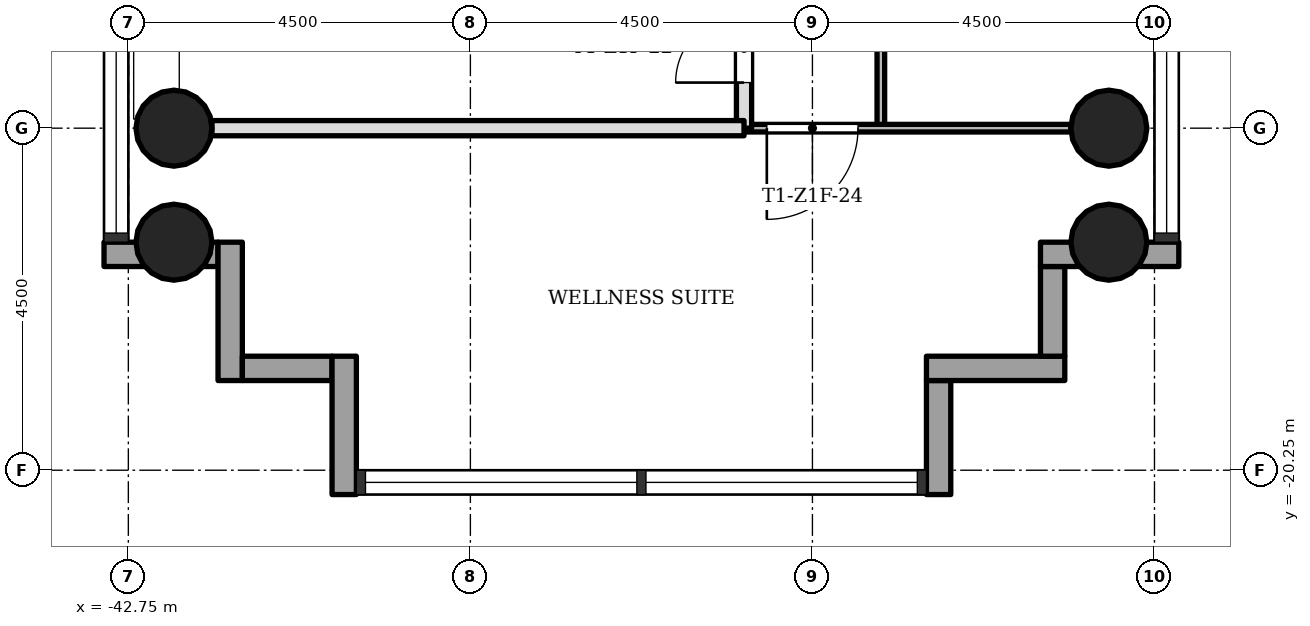
"""IFC4 building model, lengths in metres.
Left out: names, types, materials, properties, quantities, classifications, styles, units other than length and angle.
Written with IfcOpenShell. Run it as: python <this file> out.ifc"""

import sys

from ifc_helpers import new_model, si_unit, direction, frame, frame_2d, origin, origin_2d, place, context, subcontext, project, spatial, rectangle, hollow_circle, extrude, element, fill, save


model = new_model("IFC4")
c1 = context("Model", 3, precision=1e-05, world=origin(), true_north=direction((0.0, 1.0)))
c2 = subcontext(c1, "Body", "Model", "MODEL_VIEW")
j1 = project(units=[si_unit("LENGTHUNIT", "METRE"), si_unit("PLANEANGLEUNIT", "RADIAN")], contexts=[c1])
p1 = place(None, origin())
s1 = spatial("IfcSite", under=j1, at=p1, CompositionType="ELEMENT")
p2 = place(p1, origin())
s2 = spatial("IfcBuilding", under=s1, at=p2, CompositionType="ELEMENT")
p3 = place(p2, frame((0.0, 0.0, 68.7)))
s3 = spatial("IfcBuildingStorey", under=s2, at=p3, CompositionType="ELEMENT", Elevation=68.7)
for number, where, z_axis, x_axis in (
    (1, (-42.15, -15.75, 0.0), (0.0, 0.0, 1.0), (1.0, 0.0, 0.0)),
    (2, (-29.85, -15.75, 0.0), (0.0, 0.0, 1.0), (1.0, 0.0, 0.0)),
    (3, (-42.15, -17.25, 0.0), (0.0, 0.0, 1.0), (1.0, 0.0, 0.0)),
    (4, (-29.85, -17.25, 0.0), (0.0, 0.0, 1.0), (1.0, 0.0, 0.0)),
):
    element("IfcColumn", number, at=place(p3, frame(where, z_axis=z_axis, x_axis=x_axis)), inside=s3, PredefinedType="COLUMN", context=c2, shape_type="SweptSolid", body=[
        extrude(hollow_circle(Radius=0.5, WallThickness=0.036, at=origin_2d()), origin(), (0.0, 0.0, 1.0), 3.4),
    ])
p4 = place(p3, frame((-43.07, -17.41, -0.3), z_axis=(0.0, 0.0, 1.0), x_axis=(1.0, 0.0, 0.0)))
e5 = element("IfcWall", 5, at=p4, inside=s3, PredefinedType="STANDARD", context=c2, shape_type="SweptSolid", body=[
    extrude(rectangle(XDim=1.5, YDim=0.32, at=frame_2d((0.75, 0.0))), origin(), (0.0, 0.0, 1.0), 3.4),
])
p5 = place(p3, frame((-41.41, -17.25, -0.3), z_axis=(0.0, 0.0, 1.0), x_axis=(0.0, -1.0, 0.0)))
e6 = element("IfcWall", 6, at=p5, inside=s3, PredefinedType="STANDARD", context=c2, shape_type="SweptSolid", body=[
    extrude(rectangle(XDim=1.82, YDim=0.32, at=frame_2d((0.91, 0.0))), origin(), (0.0, 0.0, 1.0), 3.4),
])
p6 = place(p3, frame((-41.25, -18.91, -0.3), z_axis=(0.0, 0.0, 1.0), x_axis=(1.0, 0.0, 0.0)))
e7 = element("IfcWall", 7, at=p6, inside=s3, PredefinedType="STANDARD", context=c2, shape_type="SweptSolid", body=[
    extrude(rectangle(XDim=1.18, YDim=0.32, at=frame_2d((0.59, 0.0))), origin(), (0.0, 0.0, 1.0), 3.4),
])
p7 = place(p3, frame((-39.91, -18.75, -0.3), z_axis=(0.0, 0.0, 1.0), x_axis=(0.0, -1.0, 0.0)))
e8 = element("IfcWall", 8, at=p7, inside=s3, PredefinedType="STANDARD", context=c2, shape_type="SweptSolid", body=[
    extrude(rectangle(XDim=1.82, YDim=0.32, at=frame_2d((0.91, 0.0))), origin(), (0.0, 0.0, 1.0), 3.4),
])
p8 = place(p3, frame((-32.09, -20.57, -0.3), z_axis=(0.0, 0.0, 1.0), x_axis=(0.0, 1.0, 0.0)))
e9 = element("IfcWall", 9, at=p8, inside=s3, PredefinedType="STANDARD", context=c2, shape_type="SweptSolid", body=[
    extrude(rectangle(XDim=1.5, YDim=0.32, at=frame_2d((0.75, 0.0))), origin(), (0.0, 0.0, 1.0), 3.4),
])
p9 = place(p3, frame((-32.25, -18.91, -0.3), z_axis=(0.0, 0.0, 1.0), x_axis=(1.0, 0.0, 0.0)))
e10 = element("IfcWall", 10, at=p9, inside=s3, PredefinedType="STANDARD", context=c2, shape_type="SweptSolid", body=[
    extrude(rectangle(XDim=1.82, YDim=0.32, at=frame_2d((0.91, 0.0))), origin(), (0.0, 0.0, 1.0), 3.4),
])
p10 = place(p3, frame((-30.59, -18.75, -0.3), z_axis=(0.0, 0.0, 1.0), x_axis=(0.0, 1.0, 0.0)))
e11 = element("IfcWall", 11, at=p10, inside=s3, PredefinedType="STANDARD", context=c2, shape_type="SweptSolid", body=[
    extrude(rectangle(XDim=1.18, YDim=0.32, at=frame_2d((0.59, 0.0))), origin(), (0.0, 0.0, 1.0), 3.4),
])
p11 = place(p3, frame((-30.75, -17.41, -0.3), z_axis=(0.0, 0.0, 1.0), x_axis=(1.0, 0.0, 0.0)))
e12 = element("IfcWall", 12, at=p11, inside=s3, PredefinedType="STANDARD", context=c2, shape_type="SweptSolid", body=[
    extrude(rectangle(XDim=1.82, YDim=0.32, at=frame_2d((0.91, 0.0))), origin(), (0.0, 0.0, 1.0), 3.4),
])
p12 = place(p3, frame((-34.65, -15.75, 0.0), z_axis=(0.0, 0.0, 1.0), x_axis=(0.0, 1.0, 0.0)))
e13 = element("IfcWall", 13, at=p12, inside=s3, PredefinedType="SOLIDWALL", context=c2, shape_type="SweptSolid", body=[
    extrude(rectangle(XDim=4.5, YDim=0.2, at=frame_2d((2.25, 0.0))), origin(), (0.0, 0.0, 1.0), 3.0),
])
p13 = place(p12, frame((0.6, 0.0, 0.0)))
e14 = element("IfcOpeningElement", 14, at=p13, cuts=e13, PredefinedType="OPENING", context=c2, shape_type="SweptSolid", body=[
    extrude(rectangle(XDim=0.9, YDim=2.1, at=frame_2d((0.45, 1.05))), frame((0.0, 0.11, 0.0), z_axis=(0.0, -1.0, 0.0), x_axis=(1.0, 0.0, 0.0)), (0.0, 0.0, 1.0), 0.22),
])
p14 = place(p3, frame((-32.85, -15.75, 0.0), z_axis=(0.0, 0.0, 1.0), x_axis=(0.0, 1.0, 0.0)))
e15 = element("IfcWall", 15, at=p14, inside=s3, PredefinedType="PARTITIONING", context=c2, shape_type="SweptSolid", body=[
    extrude(rectangle(XDim=9.0, YDim=0.1, at=frame_2d((4.5, 0.0))), origin(), (0.0, 0.0, 1.0), 3.0),
])
p15 = place(p14, frame((6.3, 0.0, 0.0)))
e16 = element("IfcOpeningElement", 16, at=p15, cuts=e15, PredefinedType="OPENING", context=c2, shape_type="SweptSolid", body=[
    extrude(rectangle(XDim=0.9, YDim=2.1, at=frame_2d((0.45, 1.05))), frame((0.0, 0.06, 0.0), z_axis=(0.0, -1.0, 0.0), x_axis=(1.0, 0.0, 0.0)), (0.0, 0.0, 1.0), 0.12),
])
p16 = place(p14, frame((1.8, 0.0, 0.0)))
e17 = element("IfcOpeningElement", 17, at=p16, cuts=e15, PredefinedType="OPENING", context=c2, shape_type="SweptSolid", body=[
    extrude(rectangle(XDim=0.9, YDim=2.1, at=frame_2d((0.45, 1.05))), frame((0.0, 0.06, 0.0), z_axis=(0.0, -1.0, 0.0), x_axis=(1.0, 0.0, 0.0)), (0.0, 0.0, 1.0), 0.12),
])
p17 = place(p3, frame((-34.65, -15.75, 0.0), z_axis=(0.0, 0.0, 1.0), x_axis=(1.0, 0.0, 0.0)))
e18 = element("IfcWall", 18, at=p17, inside=s3, PredefinedType="PARTITIONING", context=c2, shape_type="SweptSolid", body=[
    extrude(rectangle(XDim=4.3, YDim=0.1, at=frame_2d((2.15, 0.0))), origin(), (0.0, 0.0, 1.0), 3.0),
])
p18 = place(p17, frame((0.3, 0.0, 0.0)))
e19 = element("IfcOpeningElement", 19, at=p18, cuts=e18, PredefinedType="OPENING", context=c2, shape_type="SweptSolid", body=[
    extrude(rectangle(XDim=1.2, YDim=2.1, at=frame_2d((0.6, 1.05))), frame((0.0, 0.06, 0.0), z_axis=(0.0, -1.0, 0.0), x_axis=(1.0, 0.0, 0.0)), (0.0, 0.0, 1.0), 0.12),
])
p19 = place(p3, frame((-41.65, -15.75, 0.0), z_axis=(0.0, 0.0, 1.0), x_axis=(1.0, 0.0, 0.0)))
e20 = element("IfcWall", 20, at=p19, inside=s3, PredefinedType="SOLIDWALL", context=c2, shape_type="SweptSolid", body=[
    extrude(rectangle(XDim=7.0, YDim=0.2, at=frame_2d((3.5, 0.0))), origin(), (0.0, 0.0, 1.0), 3.0),
])
p20 = place(p13, origin())
e21 = element("IfcDoor", 21, at=p20, inside=s3, OperationType="SINGLE_SWING_RIGHT", PredefinedType="DOOR", context=c2, shape_type="SweptSolid", body=[
    extrude(rectangle(XDim=0.9, YDim=2.1, at=frame_2d((0.45, 1.05))), frame((0.0, 0.025, 0.0), z_axis=(0.0, -1.0, 0.0), x_axis=(1.0, 0.0, 0.0)), (0.0, 0.0, 1.0), 0.05),
])
fill(e14, e21)
p21 = place(p18, origin())
e22 = element("IfcDoor", 22, at=p21, inside=s3, OperationType="SINGLE_SWING_LEFT", PredefinedType="DOOR", context=c2, shape_type="SweptSolid", body=[
    extrude(rectangle(XDim=1.2, YDim=2.1, at=frame_2d((0.6, 1.05))), frame((0.0, 0.025, 0.0), z_axis=(0.0, -1.0, 0.0), x_axis=(1.0, 0.0, 0.0)), (0.0, 0.0, 1.0), 0.05),
])
fill(e19, e22)
save(model, sys.argv[1])
